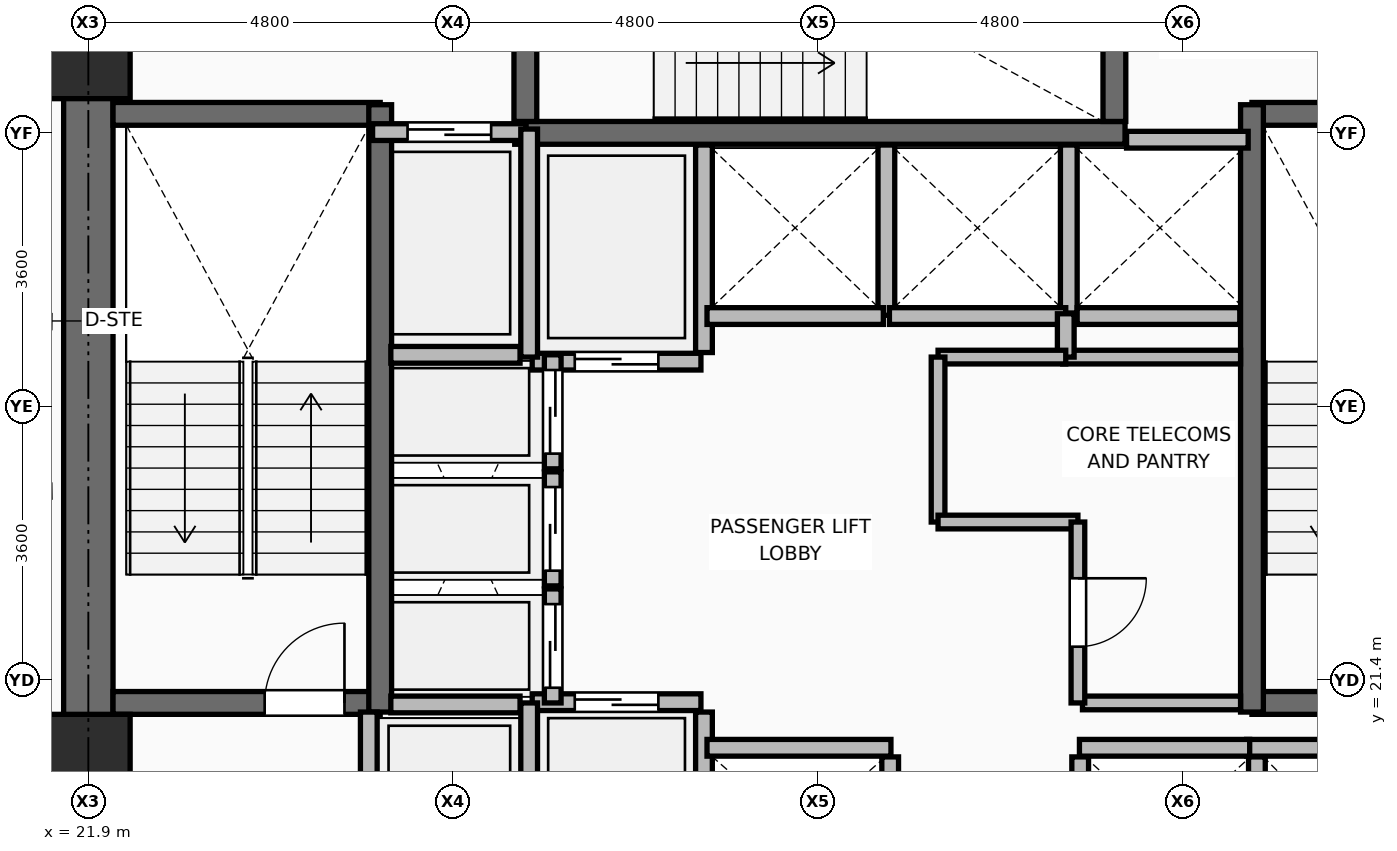
"""IFC4 building model, lengths in metres.
Left out: names, types, materials, properties, quantities, classifications, styles, units other than length and angle.
Written with IfcOpenShell. Run it as: python <this file> out.ifc"""

import sys

from ifc_helpers import new_model, si_unit, direction, frame, frame_2d, origin, origin_2d, place, context, subcontext, project, spatial, rectangle, extrude, element, fill, save


model = new_model("IFC4")
c1 = context("Model", 3, precision=1e-05, world=origin(), true_north=direction((0.0, 1.0)))
c2 = subcontext(c1, "Body", "Model", "MODEL_VIEW")
j1 = project(units=[si_unit("LENGTHUNIT", "METRE"), si_unit("PLANEANGLEUNIT", "RADIAN")], contexts=[c1])
p1 = place(None, origin())
s1 = spatial("IfcSite", under=j1, at=p1, CompositionType="ELEMENT")
p2 = place(p1, origin())
s2 = spatial("IfcBuilding", under=s1, at=p2, CompositionType="ELEMENT")
p3 = place(p2, frame((0.0, 0.0, 49.5)))
s3 = spatial("IfcBuildingStorey", under=s2, at=p3, CompositionType="ELEMENT", Elevation=49.5)
for number, where, z_axis, x_axis in (
    (1, (21.9, 20.4, 0.0), (0.0, 0.0, 1.0), (1.0, 0.0, 0.0)),
    (2, (21.9, 29.6, 0.0), (0.0, 0.0, 1.0), (1.0, 0.0, 0.0)),
):
    element("IfcColumn", number, at=place(p3, frame(where, z_axis=z_axis, x_axis=x_axis)), inside=s3, PredefinedType="COLUMN", context=c2, shape_type="SweptSolid", body=[
        extrude(rectangle(XDim=1.1, YDim=1.1, at=origin_2d()), origin(), (0.0, 0.0, 1.0), 3.75),
    ])
p4 = place(p3, frame((30.0, 18.08, 0.0), z_axis=(0.0, 0.0, 1.0), x_axis=(0.0, 1.0, 0.0)))
e3 = element("IfcWall", 3, at=p4, inside=s3, PredefinedType="PARTITIONING", context=c2, shape_type="SweptSolid", body=[
    extrude(rectangle(XDim=2.9, YDim=0.22, at=frame_2d((1.45, 0.0))), origin(), (0.0, 0.0, 1.0), 3.545),
])
for number, where, z_axis, x_axis in (
    (4, (32.45, 17.92, 0.0), (0.0, 0.0, 1.0), (0.0, 1.0, 0.0)),
    (5, (34.95, 17.92, 0.0), (0.0, 0.0, 1.0), (0.0, 1.0, 0.0)),
):
    element("IfcWall", number, at=place(p3, frame(where, z_axis=z_axis, x_axis=x_axis)), inside=s3, PredefinedType="PARTITIONING", context=c2, shape_type="SweptSolid", body=[
        extrude(rectangle(XDim=2.47, YDim=0.22, at=frame_2d((1.235, 0.0))), origin(), (0.0, 0.0, 1.0), 2.928),
    ])
p5 = place(p3, frame((37.275, 18.08, 0.0), z_axis=(0.0, 0.0, 1.0), x_axis=(0.0, 1.0, 0.0)))
e6 = element("IfcWall", 6, at=p5, inside=s3, PredefinedType="PARTITIONING", context=c2, shape_type="SweptSolid", body=[
    extrude(rectangle(XDim=2.31, YDim=0.22, at=frame_2d((1.155, 0.0))), origin(), (0.0, 0.0, 1.0), 3.545),
])
p6 = place(p3, frame((30.0, 25.71, 0.0), z_axis=(0.0, 0.0, 1.0), x_axis=(0.0, 1.0, 0.0)))
e7 = element("IfcWall", 7, at=p6, inside=s3, PredefinedType="PARTITIONING", context=c2, shape_type="SweptSolid", body=[
    extrude(rectangle(XDim=2.73, YDim=0.22, at=frame_2d((1.365, 0.0))), origin(), (0.0, 0.0, 1.0), 3.545),
])
p7 = place(p3, frame((32.4, 26.2, 0.0), z_axis=(0.0, 0.0, 1.0), x_axis=(0.0, 1.0, 0.0)))
e8 = element("IfcWall", 8, at=p7, inside=s3, PredefinedType="PARTITIONING", context=c2, shape_type="SweptSolid", body=[
    extrude(rectangle(XDim=2.24, YDim=0.22, at=frame_2d((1.12, 0.0))), origin(), (0.0, 0.0, 1.0), 3.545),
])
p8 = place(p3, frame((34.8, 26.23, 0.0), z_axis=(0.0, 0.0, 1.0), x_axis=(0.0, 1.0, 0.0)))
e9 = element("IfcWall", 9, at=p8, inside=s3, PredefinedType="PARTITIONING", context=c2, shape_type="SweptSolid", body=[
    extrude(rectangle(XDim=2.21, YDim=0.22, at=frame_2d((1.105, 0.0))), origin(), (0.0, 0.0, 1.0), 3.545),
])
p9 = place(p3, frame((34.91, 26.19, 0.0), z_axis=(0.0, 0.0, 1.0), x_axis=(1.0, 0.0, 0.0)))
e10 = element("IfcWall", 10, at=p9, inside=s3, PredefinedType="PARTITIONING", context=c2, shape_type="SweptSolid", body=[
    extrude(rectangle(XDim=2.14, YDim=0.22, at=frame_2d((1.07, 0.0))), origin(), (0.0, 0.0, 1.0), 3.545),
])
p10 = place(p3, frame((21.9, 18.125, 0.0), z_axis=(0.0, 0.0, 1.0), x_axis=(0.0, 1.0, 0.0)))
e11 = element("IfcWall", 11, at=p10, inside=s3, PredefinedType="SHEAR", context=c2, shape_type="SweptSolid", body=[
    extrude(rectangle(XDim=14.0, YDim=0.65, at=frame_2d((7.0, 0.0))), origin(), (0.0, 0.0, 1.0), 3.57),
])
p11 = place(p3, frame((22.225, 21.1, 0.0), z_axis=(0.0, 0.0, 1.0), x_axis=(1.0, 0.0, 0.0)))
e12 = element("IfcWall", 12, at=p11, inside=s3, PredefinedType="SHEAR", context=c2, shape_type="SweptSolid", body=[
    extrude(rectangle(XDim=3.515, YDim=0.3, at=frame_2d((1.757, 0.0))), origin(), (0.0, 0.0, 1.0), 3.57),
])
p12 = place(p11, frame((1.995, 0.0, 0.0)))
e13 = element("IfcOpeningElement", 13, at=p12, cuts=e12, PredefinedType="OPENING", context=c2, shape_type="SweptSolid", body=[
    extrude(rectangle(XDim=1.05, YDim=2.1, at=frame_2d((0.525, 1.05))), frame((0.0, 0.16, 0.0), z_axis=(0.0, -1.0, 0.0), x_axis=(1.0, 0.0, 0.0)), (0.0, 0.0, 1.0), 0.32),
])
p13 = place(p3, frame((22.225, 28.85, 0.0), z_axis=(0.0, 0.0, 1.0), x_axis=(1.0, 0.0, 0.0)))
e14 = element("IfcWall", 14, at=p13, inside=s3, PredefinedType="SHEAR", context=c2, shape_type="SweptSolid", body=[
    extrude(rectangle(XDim=3.515, YDim=0.3, at=frame_2d((1.757, 0.0))), origin(), (0.0, 0.0, 1.0), 3.57),
])
p14 = place(p3, frame((25.74, 20.98, 0.0), z_axis=(0.0, 0.0, 1.0), x_axis=(0.0, 1.0, 0.0)))
e15 = element("IfcWall", 15, at=p14, inside=s3, PredefinedType="SHEAR", context=c2, shape_type="SweptSolid", body=[
    extrude(rectangle(XDim=7.99, YDim=0.3, at=frame_2d((3.995, 0.0))), origin(), (0.0, 0.0, 1.0), 3.57),
])
for number, where, z_axis, x_axis in (
    (16, (37.21, 21.1, 0.0), (0.0, 0.0, 1.0), (1.0, 0.0, 0.0)),
    (17, (37.21, 28.85, 0.0), (0.0, 0.0, 1.0), (1.0, 0.0, 0.0)),
):
    element("IfcWall", number, at=place(p3, frame(where, z_axis=z_axis, x_axis=x_axis)), inside=s3, PredefinedType="SHEAR", context=c2, shape_type="SweptSolid", body=[
        extrude(rectangle(XDim=3.565, YDim=0.3, at=frame_2d((1.782, 0.0))), origin(), (0.0, 0.0, 1.0), 3.57),
    ])
p15 = place(p3, frame((37.21, 20.98, 0.0), z_axis=(0.0, 0.0, 1.0), x_axis=(0.0, 1.0, 0.0)))
e18 = element("IfcWall", 18, at=p15, inside=s3, PredefinedType="SHEAR", context=c2, shape_type="SweptSolid", body=[
    extrude(rectangle(XDim=7.99, YDim=0.3, at=frame_2d((3.995, 0.0))), origin(), (0.0, 0.0, 1.0), 3.57),
])
p16 = place(p3, frame((27.51, 28.6, 0.0), z_axis=(0.0, 0.0, 1.0), x_axis=(1.0, 0.0, 0.0)))
e19 = element("IfcWall", 19, at=p16, inside=s3, PredefinedType="SHEAR", context=c2, shape_type="SweptSolid", body=[
    extrude(rectangle(XDim=8.03, YDim=0.3, at=frame_2d((4.015, 0.0))), origin(), (0.0, 0.0, 1.0), 3.57),
])
p17 = place(p3, frame((27.65, 28.75, 0.0), z_axis=(0.0, 0.0, 1.0), x_axis=(0.0, 1.0, 0.0)))
e20 = element("IfcWall", 20, at=p17, inside=s3, PredefinedType="SHEAR", context=c2, shape_type="SweptSolid", body=[
    extrude(rectangle(XDim=3.375, YDim=0.3, at=frame_2d((1.688, 0.0))), origin(), (0.0, 0.0, 1.0), 3.57),
])
p18 = place(p17, frame((1.0, 0.0, 0.0)))
e21 = element("IfcOpeningElement", 21, at=p18, cuts=e20, PredefinedType="OPENING", context=c2, shape_type="SweptSolid", body=[
    extrude(rectangle(XDim=1.05, YDim=2.1, at=frame_2d((0.525, 1.05))), frame((0.0, 0.16, 0.0), z_axis=(0.0, -1.0, 0.0), x_axis=(1.0, 0.0, 0.0)), (0.0, 0.0, 1.0), 0.32),
])
p19 = place(p3, frame((35.4, 28.75, 0.0), z_axis=(0.0, 0.0, 1.0), x_axis=(0.0, 1.0, 0.0)))
e22 = element("IfcWall", 22, at=p19, inside=s3, PredefinedType="SHEAR", context=c2, shape_type="SweptSolid", body=[
    extrude(rectangle(XDim=3.375, YDim=0.3, at=frame_2d((1.688, 0.0))), origin(), (0.0, 0.0, 1.0), 3.57),
])
p20 = place(p3, frame((25.59, 18.22, 0.0), z_axis=(0.0, 0.0, 1.0), x_axis=(0.0, 1.0, 0.0)))
e23 = element("IfcWall", 23, at=p20, inside=s3, PredefinedType="PARTITIONING", context=c2, shape_type="SweptSolid", body=[
    extrude(rectangle(XDim=2.76, YDim=0.22, at=frame_2d((1.38, 0.0))), origin(), (0.0, 0.0, 1.0), 3.55),
])
p21 = place(p20, frame((0.83, 0.0, 0.0)))
e24 = element("IfcOpeningElement", 24, at=p21, cuts=e23, PredefinedType="OPENING", context=c2, shape_type="SweptSolid", body=[
    extrude(rectangle(XDim=1.1, YDim=2.2, at=frame_2d((0.55, 1.1))), frame((0.0, 0.12, 0.0), z_axis=(0.0, -1.0, 0.0), x_axis=(1.0, 0.0, 0.0)), (0.0, 0.0, 1.0), 0.24),
])
p22 = place(p3, frame((25.64, 28.61, 0.0), z_axis=(0.0, 0.0, 1.0), x_axis=(1.0, 0.0, 0.0)))
e25 = element("IfcWall", 25, at=p22, inside=s3, PredefinedType="PARTITIONING", context=c2, shape_type="SweptSolid", body=[
    extrude(rectangle(XDim=2.02, YDim=0.22, at=frame_2d((1.01, 0.0))), origin(), (0.0, 0.0, 1.0), 3.55),
])
p23 = place(p22, frame((0.46, 0.0, 0.0)))
e26 = element("IfcOpeningElement", 26, at=p23, cuts=e25, PredefinedType="OPENING", context=c2, shape_type="SweptSolid", body=[
    extrude(rectangle(XDim=1.1, YDim=2.2, at=frame_2d((0.55, 1.1))), frame((0.0, 0.12, 0.0), z_axis=(0.0, -1.0, 0.0), x_axis=(1.0, 0.0, 0.0)), (0.0, 0.0, 1.0), 0.24),
])
p24 = place(p3, frame((27.74, 21.11, 0.0), z_axis=(0.0, 0.0, 1.0), x_axis=(1.0, 0.0, 0.0)))
e27 = element("IfcWall", 27, at=p24, inside=s3, PredefinedType="PARTITIONING", context=c2, shape_type="SweptSolid", body=[
    extrude(rectangle(XDim=2.22, YDim=0.22, at=frame_2d((1.11, 0.0))), origin(), (0.0, 0.0, 1.0), 3.55),
])
p25 = place(p24, frame((0.56, 0.0, 0.0)))
e28 = element("IfcOpeningElement", 28, at=p25, cuts=e27, PredefinedType="OPENING", context=c2, shape_type="SweptSolid", body=[
    extrude(rectangle(XDim=1.1, YDim=2.2, at=frame_2d((0.55, 1.1))), frame((0.0, 0.12, 0.0), z_axis=(0.0, -1.0, 0.0), x_axis=(1.0, 0.0, 0.0)), (0.0, 0.0, 1.0), 0.24),
])
p26 = place(p3, frame((27.74, 25.59, 0.0), z_axis=(0.0, 0.0, 1.0), x_axis=(1.0, 0.0, 0.0)))
e29 = element("IfcWall", 29, at=p26, inside=s3, PredefinedType="PARTITIONING", context=c2, shape_type="SweptSolid", body=[
    extrude(rectangle(XDim=2.22, YDim=0.22, at=frame_2d((1.11, 0.0))), origin(), (0.0, 0.0, 1.0), 3.55),
])
p27 = place(p26, frame((0.56, 0.0, 0.0)))
e30 = element("IfcOpeningElement", 30, at=p27, cuts=e29, PredefinedType="OPENING", context=c2, shape_type="SweptSolid", body=[
    extrude(rectangle(XDim=1.1, YDim=2.2, at=frame_2d((0.55, 1.1))), frame((0.0, 0.12, 0.0), z_axis=(0.0, -1.0, 0.0), x_axis=(1.0, 0.0, 0.0)), (0.0, 0.0, 1.0), 0.24),
])
p28 = place(p3, frame((30.04, 20.51, 0.0), z_axis=(0.0, 0.0, 1.0), x_axis=(1.0, 0.0, 0.0)))
e31 = element("IfcWall", 31, at=p28, inside=s3, PredefinedType="PARTITIONING", context=c2, shape_type="SweptSolid", body=[
    extrude(rectangle(XDim=2.42, YDim=0.22, at=frame_2d((1.21, 0.0))), origin(), (0.0, 0.0, 1.0), 3.55),
])
for number, where, z_axis, x_axis in (
    (32, (37.14, 20.51, 0.0), (0.0, 0.0, 1.0), (1.0, 0.0, 0.0)),
    (33, (34.94, 20.51, 0.0), (0.0, 0.0, 1.0), (1.0, 0.0, 0.0)),
):
    element("IfcWall", number, at=place(p3, frame(where, z_axis=z_axis, x_axis=x_axis)), inside=s3, PredefinedType="PARTITIONING", context=c2, shape_type="SweptSolid", body=[
        extrude(rectangle(XDim=2.24, YDim=0.22, at=frame_2d((1.12, 0.0))), origin(), (0.0, 0.0, 1.0), 3.55),
    ])
for number, where, z_axis, x_axis in (
    (34, (30.04, 26.19, 0.0), (0.0, 0.0, 1.0), (1.0, 0.0, 0.0)),
    (35, (32.44, 26.19, 0.0), (0.0, 0.0, 1.0), (1.0, 0.0, 0.0)),
):
    element("IfcWall", number, at=place(p3, frame(where, z_axis=z_axis, x_axis=x_axis)), inside=s3, PredefinedType="PARTITIONING", context=c2, shape_type="SweptSolid", body=[
        extrude(rectangle(XDim=2.32, YDim=0.22, at=frame_2d((1.16, 0.0))), origin(), (0.0, 0.0, 1.0), 3.55),
    ])
p29 = place(p3, frame((35.56, 28.51, 0.0), z_axis=(0.0, 0.0, 1.0), x_axis=(1.0, 0.0, 0.0)))
e36 = element("IfcWall", 36, at=p29, inside=s3, PredefinedType="PARTITIONING", context=c2, shape_type="SweptSolid", body=[
    extrude(rectangle(XDim=1.6, YDim=0.22, at=frame_2d((0.8, 0.0))), origin(), (0.0, 0.0, 1.0), 3.55),
])
p30 = place(p3, frame((28.01, 21.1, 0.0), z_axis=(0.0, 0.0, 1.0), x_axis=(0.0, 1.0, 0.0)))
e37 = element("IfcWall", 37, at=p30, inside=s3, PredefinedType="PARTITIONING", context=c2, shape_type="SweptSolid", body=[
    extrude(rectangle(XDim=1.5, YDim=0.22, at=frame_2d((0.75, 0.0))), origin(), (0.0, 0.0, 1.0), 3.55),
])
p31 = place(p30, frame((0.2, 0.0, 0.0)))
e38 = element("IfcOpeningElement", 38, at=p31, cuts=e37, PredefinedType="OPENING", context=c2, shape_type="SweptSolid", body=[
    extrude(rectangle(XDim=1.1, YDim=2.2, at=frame_2d((0.55, 1.1))), frame((0.0, 0.12, 0.0), z_axis=(0.0, -1.0, 0.0), x_axis=(1.0, 0.0, 0.0)), (0.0, 0.0, 1.0), 0.24),
])
p32 = place(p3, frame((28.01, 22.64, 0.0), z_axis=(0.0, 0.0, 1.0), x_axis=(0.0, 1.0, 0.0)))
e39 = element("IfcWall", 39, at=p32, inside=s3, PredefinedType="PARTITIONING", context=c2, shape_type="SweptSolid", body=[
    extrude(rectangle(XDim=1.5, YDim=0.22, at=frame_2d((0.75, 0.0))), origin(), (0.0, 0.0, 1.0), 3.55),
])
p33 = place(p32, frame((0.2, 0.0, 0.0)))
e40 = element("IfcOpeningElement", 40, at=p33, cuts=e39, PredefinedType="OPENING", context=c2, shape_type="SweptSolid", body=[
    extrude(rectangle(XDim=1.1, YDim=2.2, at=frame_2d((0.55, 1.1))), frame((0.0, 0.12, 0.0), z_axis=(0.0, -1.0, 0.0), x_axis=(1.0, 0.0, 0.0)), (0.0, 0.0, 1.0), 0.24),
])
p34 = place(p3, frame((28.01, 24.18, 0.0), z_axis=(0.0, 0.0, 1.0), x_axis=(0.0, 1.0, 0.0)))
e41 = element("IfcWall", 41, at=p34, inside=s3, PredefinedType="PARTITIONING", context=c2, shape_type="SweptSolid", body=[
    extrude(rectangle(XDim=1.5, YDim=0.22, at=frame_2d((0.75, 0.0))), origin(), (0.0, 0.0, 1.0), 3.55),
])
p35 = place(p34, frame((0.2, 0.0, 0.0)))
e42 = element("IfcOpeningElement", 42, at=p35, cuts=e41, PredefinedType="OPENING", context=c2, shape_type="SweptSolid", body=[
    extrude(rectangle(XDim=1.1, YDim=2.2, at=frame_2d((0.55, 1.1))), frame((0.0, 0.12, 0.0), z_axis=(0.0, -1.0, 0.0), x_axis=(1.0, 0.0, 0.0)), (0.0, 0.0, 1.0), 0.24),
])
p36 = place(p3, frame((27.7, 18.15, 0.0), z_axis=(0.0, 0.0, 1.0), x_axis=(0.0, 1.0, 0.0)))
e43 = element("IfcWall", 43, at=p36, inside=s3, PredefinedType="PARTITIONING", context=c2, shape_type="SweptSolid", body=[
    extrude(rectangle(XDim=2.95, YDim=0.22, at=frame_2d((1.475, 0.0))), origin(), (0.0, 0.0, 1.0), 3.55),
])
p37 = place(p3, frame((27.7, 25.65, 0.0), z_axis=(0.0, 0.0, 1.0), x_axis=(0.0, 1.0, 0.0)))
e44 = element("IfcWall", 44, at=p37, inside=s3, PredefinedType="PARTITIONING", context=c2, shape_type="SweptSolid", body=[
    extrude(rectangle(XDim=3.0, YDim=0.22, at=frame_2d((1.5, 0.0))), origin(), (0.0, 0.0, 1.0), 3.55),
])
for number, where, z_axis, x_axis in (
    (45, (25.88, 21.08, 0.0), (0.0, 0.0, 1.0), (1.0, 0.0, 0.0)),
    (46, (25.88, 25.68, 0.0), (0.0, 0.0, 1.0), (1.0, 0.0, 0.0)),
):
    element("IfcWall", number, at=place(p3, frame(where, z_axis=z_axis, x_axis=x_axis)), inside=s3, PredefinedType="PARTITIONING", context=c2, shape_type="SweptSolid", body=[
        extrude(rectangle(XDim=1.7, YDim=0.22, at=frame_2d((0.85, 0.0))), origin(), (0.0, 0.0, 1.0), 3.55),
    ])
p38 = place(p3, frame((34.98, 21.1, 0.0), z_axis=(0.0, 0.0, 1.0), x_axis=(1.0, 0.0, 0.0)))
e47 = element("IfcWall", 47, at=p38, inside=s3, PredefinedType="PARTITIONING", context=c2, shape_type="SweptSolid", body=[
    extrude(rectangle(XDim=2.08, YDim=0.18, at=frame_2d((1.04, 0.0))), origin(), (0.0, 0.0, 1.0), 3.55),
])
p39 = place(p3, frame((34.72, 25.65, 0.0), z_axis=(0.0, 0.0, 1.0), x_axis=(1.0, 0.0, 0.0)))
e48 = element("IfcWall", 48, at=p39, inside=s3, PredefinedType="PARTITIONING", context=c2, shape_type="SweptSolid", body=[
    extrude(rectangle(XDim=2.34, YDim=0.18, at=frame_2d((1.17, 0.0))), origin(), (0.0, 0.0, 1.0), 3.55),
])
p40 = place(p3, frame((34.76, 25.65, 0.0), z_axis=(0.0, 0.0, 1.0), x_axis=(0.0, 1.0, 0.0)))
e49 = element("IfcWall", 49, at=p40, inside=s3, PredefinedType="PARTITIONING", context=c2, shape_type="SweptSolid", body=[
    extrude(rectangle(XDim=0.57, YDim=0.22, at=frame_2d((0.285, 0.0))), origin(), (0.0, 0.0, 1.0), 3.55),
])
p41 = place(p3, frame((33.08, 25.65, 0.0), z_axis=(0.0, 0.0, 1.0), x_axis=(1.0, 0.0, 0.0)))
e50 = element("IfcWall", 50, at=p41, inside=s3, PredefinedType="PARTITIONING", context=c2, shape_type="SweptSolid", body=[
    extrude(rectangle(XDim=1.68, YDim=0.18, at=frame_2d((0.84, 0.0))), origin(), (0.0, 0.0, 1.0), 3.55),
])
p42 = place(p3, frame((33.08, 23.48, 0.0), z_axis=(0.0, 0.0, 1.0), x_axis=(0.0, 1.0, 0.0)))
e51 = element("IfcWall", 51, at=p42, inside=s3, PredefinedType="PARTITIONING", context=c2, shape_type="SweptSolid", body=[
    extrude(rectangle(XDim=2.17, YDim=0.18, at=frame_2d((1.085, 0.0))), origin(), (0.0, 0.0, 1.0), 3.55),
])
p43 = place(p3, frame((33.08, 23.48, 0.0), z_axis=(0.0, 0.0, 1.0), x_axis=(1.0, 0.0, 0.0)))
e52 = element("IfcWall", 52, at=p43, inside=s3, PredefinedType="PARTITIONING", context=c2, shape_type="SweptSolid", body=[
    extrude(rectangle(XDim=1.84, YDim=0.18, at=frame_2d((0.92, 0.0))), origin(), (0.0, 0.0, 1.0), 3.55),
])
p44 = place(p3, frame((34.92, 21.1, 0.0), z_axis=(0.0, 0.0, 1.0), x_axis=(0.0, 1.0, 0.0)))
e53 = element("IfcWall", 53, at=p44, inside=s3, PredefinedType="PARTITIONING", context=c2, shape_type="SweptSolid", body=[
    extrude(rectangle(XDim=2.38, YDim=0.18, at=frame_2d((1.19, 0.0))), origin(), (0.0, 0.0, 1.0), 3.55),
])
p45 = place(p44, frame((0.74, 0.0, 0.0)))
e54 = element("IfcOpeningElement", 54, at=p45, cuts=e53, PredefinedType="OPENING", context=c2, shape_type="SweptSolid", body=[
    extrude(rectangle(XDim=0.9, YDim=2.1, at=frame_2d((0.45, 1.05))), frame((0.0, 0.1, 0.0), z_axis=(0.0, -1.0, 0.0), x_axis=(1.0, 0.0, 0.0)), (0.0, 0.0, 1.0), 0.2),
])
p46 = place(p12, origin())
e55 = element("IfcDoor", 55, at=p46, inside=s3, OperationType="SINGLE_SWING_RIGHT", PredefinedType="DOOR", context=c2, shape_type="SweptSolid", body=[
    extrude(rectangle(XDim=1.05, YDim=2.1, at=frame_2d((0.525, 1.05))), frame((0.0, 0.025, 0.0), z_axis=(0.0, -1.0, 0.0), x_axis=(1.0, 0.0, 0.0)), (0.0, 0.0, 1.0), 0.05),
])
fill(e13, e55)
p47 = place(p23, origin())
e56 = element("IfcDoor", 56, at=p47, inside=s3, OperationType="DOUBLE_DOOR_SLIDING", PredefinedType="DOOR", context=c2, shape_type="SweptSolid", body=[
    extrude(rectangle(XDim=1.1, YDim=2.2, at=frame_2d((0.55, 1.1))), frame((0.0, 0.025, 0.0), z_axis=(0.0, -1.0, 0.0), x_axis=(1.0, 0.0, 0.0)), (0.0, 0.0, 1.0), 0.05),
])
fill(e26, e56)
p48 = place(p25, origin())
e57 = element("IfcDoor", 57, at=p48, inside=s3, OperationType="DOUBLE_DOOR_SLIDING", PredefinedType="DOOR", context=c2, shape_type="SweptSolid", body=[
    extrude(rectangle(XDim=1.1, YDim=2.2, at=frame_2d((0.55, 1.1))), frame((0.0, 0.025, 0.0), z_axis=(0.0, -1.0, 0.0), x_axis=(1.0, 0.0, 0.0)), (0.0, 0.0, 1.0), 0.05),
])
fill(e28, e57)
p49 = place(p27, frame((1.1, 0.0, 0.0), z_axis=(0.0, 0.0, 1.0), x_axis=(-1.0, 0.0, 0.0)))
e58 = element("IfcDoor", 58, at=p49, inside=s3, OperationType="DOUBLE_DOOR_SLIDING", PredefinedType="DOOR", context=c2, shape_type="SweptSolid", body=[
    extrude(rectangle(XDim=1.1, YDim=2.2, at=frame_2d((0.55, 1.1))), frame((0.0, 0.025, 0.0), z_axis=(0.0, -1.0, 0.0), x_axis=(1.0, 0.0, 0.0)), (0.0, 0.0, 1.0), 0.05),
])
fill(e30, e58)
p50 = place(p31, frame((1.1, 0.0, 0.0), z_axis=(0.0, 0.0, 1.0), x_axis=(-1.0, 0.0, 0.0)))
e59 = element("IfcDoor", 59, at=p50, inside=s3, OperationType="DOUBLE_DOOR_SLIDING", PredefinedType="DOOR", context=c2, shape_type="SweptSolid", body=[
    extrude(rectangle(XDim=1.1, YDim=2.2, at=frame_2d((0.55, 1.1))), frame((0.0, 0.025, 0.0), z_axis=(0.0, -1.0, 0.0), x_axis=(1.0, 0.0, 0.0)), (0.0, 0.0, 1.0), 0.05),
])
fill(e38, e59)
p51 = place(p33, frame((1.1, 0.0, 0.0), z_axis=(0.0, 0.0, 1.0), x_axis=(-1.0, 0.0, 0.0)))
e60 = element("IfcDoor", 60, at=p51, inside=s3, OperationType="DOUBLE_DOOR_SLIDING", PredefinedType="DOOR", context=c2, shape_type="SweptSolid", body=[
    extrude(rectangle(XDim=1.1, YDim=2.2, at=frame_2d((0.55, 1.1))), frame((0.0, 0.025, 0.0), z_axis=(0.0, -1.0, 0.0), x_axis=(1.0, 0.0, 0.0)), (0.0, 0.0, 1.0), 0.05),
])
fill(e40, e60)
p52 = place(p35, frame((1.1, 0.0, 0.0), z_axis=(0.0, 0.0, 1.0), x_axis=(-1.0, 0.0, 0.0)))
e61 = element("IfcDoor", 61, at=p52, inside=s3, OperationType="DOUBLE_DOOR_SLIDING", PredefinedType="DOOR", context=c2, shape_type="SweptSolid", body=[
    extrude(rectangle(XDim=1.1, YDim=2.2, at=frame_2d((0.55, 1.1))), frame((0.0, 0.025, 0.0), z_axis=(0.0, -1.0, 0.0), x_axis=(1.0, 0.0, 0.0)), (0.0, 0.0, 1.0), 0.05),
])
fill(e42, e61)
p53 = place(p45, frame((0.9, 0.0, 0.0), z_axis=(0.0, 0.0, 1.0), x_axis=(-1.0, 0.0, 0.0)))
e62 = element("IfcDoor", 62, at=p53, inside=s3, OperationType="SINGLE_SWING_LEFT", PredefinedType="DOOR", context=c2, shape_type="SweptSolid", body=[
    extrude(rectangle(XDim=0.9, YDim=2.1, at=frame_2d((0.45, 1.05))), frame((0.0, 0.025, 0.0), z_axis=(0.0, -1.0, 0.0), x_axis=(1.0, 0.0, 0.0)), (0.0, 0.0, 1.0), 0.05),
])
fill(e54, e62)
save(model, sys.argv[1])
